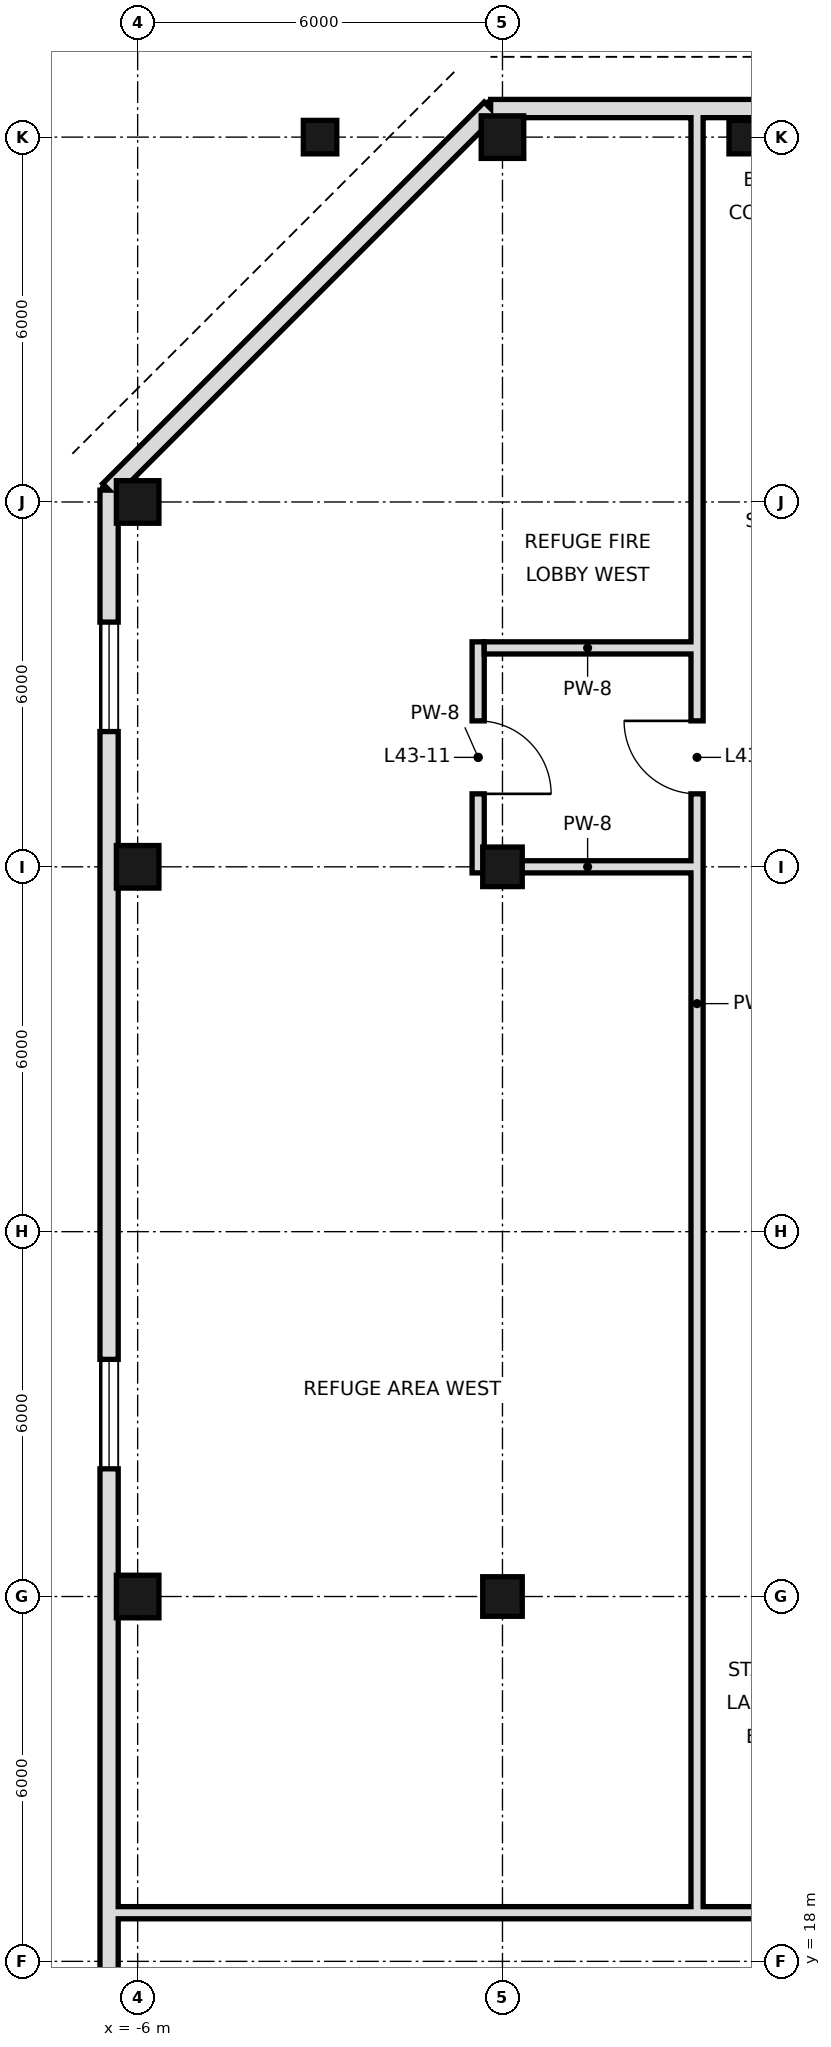
"""IFC4 building model, lengths in metres.
Left out: names, types, materials, properties, quantities, classifications, styles, units other than length and angle.
Written with IfcOpenShell. Run it as: python <this file> out.ifc"""

import sys

from ifc_helpers import new_model, si_unit, direction, frame, frame_2d, origin, origin_2d, place, context, subcontext, project, spatial, rectangle, hollow_rectangle, extrude, element, fill, save


model = new_model("IFC4")
c1 = context("Model", 3, precision=1e-05, world=origin(), true_north=direction((0.0, 1.0)))
c2 = subcontext(c1, "Body", "Model", "MODEL_VIEW")
j1 = project(units=[si_unit("LENGTHUNIT", "METRE"), si_unit("PLANEANGLEUNIT", "RADIAN")], contexts=[c1])
p1 = place(None, origin())
s1 = spatial("IfcSite", under=j1, at=p1, CompositionType="ELEMENT")
p2 = place(p1, origin())
s2 = spatial("IfcBuilding", under=s1, at=p2, CompositionType="ELEMENT")
p3 = place(p2, frame((0.0, 0.0, 186.0)))
s3 = spatial("IfcBuildingStorey", under=s2, at=p3, CompositionType="ELEMENT", Elevation=186.0)
for number, where, z_axis, x_axis in (
    (1, (-6.0, 24.0, 0.0), (0.0, 0.0, 1.0), (1.0, 0.0, 0.0)),
    (2, (-6.0, 36.0, 0.0), (0.0, 0.0, 1.0), (1.0, 0.0, 0.0)),
    (3, (-6.0, 42.0, 0.0), (0.0, 0.0, 1.0), (1.0, 0.0, 0.0)),
):
    element("IfcColumn", number, at=place(p3, frame(where, z_axis=z_axis, x_axis=x_axis)), inside=s3, PredefinedType="COLUMN", context=c2, shape_type="SweptSolid", body=[
        extrude(hollow_rectangle(XDim=0.7, YDim=0.7, WallThickness=0.036, at=origin_2d()), origin(), (0.0, 0.0, 1.0), 6.0),
    ])
for number, where, z_axis, x_axis in (
    (4, (0.0, 24.0, 0.0), (0.0, 0.0, 1.0), (1.0, 0.0, 0.0)),
    (5, (0.0, 36.0, 0.0), (0.0, 0.0, 1.0), (1.0, 0.0, 0.0)),
):
    element("IfcColumn", number, at=place(p3, frame(where, z_axis=z_axis, x_axis=x_axis)), inside=s3, PredefinedType="COLUMN", context=c2, shape_type="SweptSolid", body=[
        extrude(hollow_rectangle(XDim=0.65, YDim=0.65, WallThickness=0.032, at=origin_2d()), origin(), (0.0, 0.0, 1.0), 6.0),
    ])
p4 = place(p3, frame((0.0, 48.0, 0.0), z_axis=(0.0, 0.0, 1.0), x_axis=(1.0, 0.0, 0.0)))
e6 = element("IfcColumn", 6, at=p4, inside=s3, PredefinedType="COLUMN", context=c2, shape_type="SweptSolid", body=[
    extrude(hollow_rectangle(XDim=0.7, YDim=0.7, WallThickness=0.036, at=origin_2d()), origin(), (0.0, 0.0, 1.0), 6.0),
])
for number, where, z_axis, x_axis in (
    (7, (-3.0, 48.0, 1.1), (0.0, 0.0, 1.0), (1.0, 0.0, 0.0)),
    (8, (4.0, 48.0, 1.1), (0.0, 0.0, 1.0), (1.0, 0.0, 0.0)),
):
    element("IfcColumn", number, at=place(p3, frame(where, z_axis=z_axis, x_axis=x_axis)), inside=s3, PredefinedType="COLUMN", context=c2, shape_type="SweptSolid", body=[
        extrude(hollow_rectangle(XDim=0.55, YDim=0.55, WallThickness=0.036, at=origin_2d()), origin(), (0.0, 0.0, 1.0), 3.5),
    ])
p5 = place(p3, frame((54.195, 48.47, 0.0), z_axis=(0.0, 0.0, 1.0), x_axis=(-1.0, 0.0, 0.0)))
e9 = element("IfcWall", 9, at=p5, inside=s3, PredefinedType="SOLIDWALL", context=c2, shape_type="SweptSolid", body=[
    extrude(rectangle(XDim=54.389, YDim=0.3, at=frame_2d((27.195, 0.0))), origin(), (0.0, 0.0, 1.0), 5.7),
])
p6 = place(p3, frame((-0.195, 48.47, 0.0), z_axis=(0.0, 0.0, 1.0), x_axis=(-0.707106781187, -0.707106781187, 0.0)))
e10 = element("IfcWall", 10, at=p6, inside=s3, PredefinedType="SOLIDWALL", context=c2, shape_type="SweptSolid", body=[
    extrude(rectangle(XDim=8.875, YDim=0.3, at=frame_2d((4.438, 0.0))), origin(), (0.0, 0.0, 1.0), 5.7),
])
p7 = place(p3, frame((-6.47, 42.195, 0.0), z_axis=(0.0, 0.0, 1.0), x_axis=(0.0, -1.0, 0.0)))
e11 = element("IfcWall", 11, at=p7, inside=s3, PredefinedType="SOLIDWALL", context=c2, shape_type="SweptSolid", body=[
    extrude(rectangle(XDim=36.389, YDim=0.3, at=frame_2d((18.195, 0.0))), origin(), (0.0, 0.0, 1.0), 5.7),
])
p8 = place(p7, frame((2.17, 0.0, 0.9)))
e12 = element("IfcOpeningElement", 12, at=p8, cuts=e11, PredefinedType="OPENING", context=c2, shape_type="SweptSolid", body=[
    extrude(rectangle(XDim=1.8, YDim=1.5, at=frame_2d((0.9, 0.75))), frame((0.0, 0.16, 0.0), z_axis=(0.0, -1.0, 0.0), x_axis=(1.0, 0.0, 0.0)), (0.0, 0.0, 1.0), 0.32),
])
p9 = place(p7, frame((14.295, 0.0, 0.9)))
e13 = element("IfcOpeningElement", 13, at=p9, cuts=e11, PredefinedType="OPENING", context=c2, shape_type="SweptSolid", body=[
    extrude(rectangle(XDim=1.8, YDim=1.5, at=frame_2d((0.9, 0.75))), frame((0.0, 0.16, 0.0), z_axis=(0.0, -1.0, 0.0), x_axis=(1.0, 0.0, 0.0)), (0.0, 0.0, 1.0), 0.32),
])
p10 = place(p7, frame((26.295, 0.0, 0.9)))
e14 = element("IfcOpeningElement", 14, at=p10, cuts=e11, PredefinedType="OPENING", context=c2, shape_type="SweptSolid", body=[
    extrude(rectangle(XDim=1.8, YDim=1.5, at=frame_2d((0.9, 0.75))), frame((0.0, 0.16, 0.0), z_axis=(0.0, -1.0, 0.0), x_axis=(1.0, 0.0, 0.0)), (0.0, 0.0, 1.0), 0.32),
])
p11 = place(p3, frame((-0.4, 35.9, 0.0), z_axis=(0.0, 0.0, 1.0), x_axis=(0.0, 1.0, 0.0)))
e15 = element("IfcWall", 15, at=p11, inside=s3, PredefinedType="SOLIDWALL", context=c2, shape_type="SweptSolid", body=[
    extrude(rectangle(XDim=3.8, YDim=0.2, at=frame_2d((1.9, 0.0))), origin(), (0.0, 0.0, 1.0), 5.7),
])
p12 = place(p11, frame((1.3, 0.0, 0.0)))
e16 = element("IfcOpeningElement", 16, at=p12, cuts=e15, PredefinedType="OPENING", context=c2, shape_type="SweptSolid", body=[
    extrude(rectangle(XDim=1.2, YDim=2.4, at=frame_2d((0.6, 1.2))), frame((0.0, 0.11, 0.0), z_axis=(0.0, -1.0, 0.0), x_axis=(1.0, 0.0, 0.0)), (0.0, 0.0, 1.0), 0.22),
])
p13 = place(p3, frame((3.2, 18.9, 0.0), z_axis=(0.0, 0.0, 1.0), x_axis=(0.0, 1.0, 0.0)))
e17 = element("IfcWall", 17, at=p13, inside=s3, PredefinedType="SOLIDWALL", context=c2, shape_type="SweptSolid", body=[
    extrude(rectangle(XDim=29.7, YDim=0.2, at=frame_2d((14.85, 0.0))), origin(), (0.0, 0.0, 1.0), 5.25),
])
p14 = place(p13, frame((18.3, 0.0, 0.0)))
e18 = element("IfcOpeningElement", 18, at=p14, cuts=e17, PredefinedType="OPENING", context=c2, shape_type="SweptSolid", body=[
    extrude(rectangle(XDim=1.2, YDim=2.4, at=frame_2d((0.6, 1.2))), frame((0.0, 0.11, 0.0), z_axis=(0.0, -1.0, 0.0), x_axis=(1.0, 0.0, 0.0)), (0.0, 0.0, 1.0), 0.22),
])
p15 = place(p3, frame((-6.6, 18.8, 0.0), z_axis=(0.0, 0.0, 1.0), x_axis=(1.0, 0.0, 0.0)))
e19 = element("IfcWall", 19, at=p15, inside=s3, PredefinedType="SOLIDWALL", context=c2, shape_type="SweptSolid", body=[
    extrude(rectangle(XDim=67.2, YDim=0.2, at=frame_2d((33.6, 0.0))), origin(), (0.0, 0.0, 1.0), 5.0),
])
p16 = place(p15, frame((17.2, 0.0, 0.0)))
e20 = element("IfcOpeningElement", 20, at=p16, cuts=e19, PredefinedType="OPENING", context=c2, shape_type="SweptSolid", body=[
    extrude(rectangle(XDim=1.2, YDim=2.4, at=frame_2d((0.6, 1.2))), frame((0.0, 0.11, 0.0), z_axis=(0.0, -1.0, 0.0), x_axis=(1.0, 0.0, 0.0)), (0.0, 0.0, 1.0), 0.22),
])
p17 = place(p3, frame((-0.3, 36.0, 0.0), z_axis=(0.0, 0.0, 1.0), x_axis=(1.0, 0.0, 0.0)))
e21 = element("IfcWall", 21, at=p17, inside=s3, PredefinedType="SOLIDWALL", context=c2, shape_type="SweptSolid", body=[
    extrude(rectangle(XDim=3.4, YDim=0.2, at=frame_2d((1.7, 0.0))), origin(), (0.0, 0.0, 1.0), 5.7),
])
p18 = place(p3, frame((-0.3, 39.6, 0.0), z_axis=(0.0, 0.0, 1.0), x_axis=(1.0, 0.0, 0.0)))
e22 = element("IfcWall", 22, at=p18, inside=s3, PredefinedType="SOLIDWALL", context=c2, shape_type="SweptSolid", body=[
    extrude(rectangle(XDim=3.4, YDim=0.2, at=frame_2d((1.7, 0.0))), origin(), (0.0, 0.0, 1.0), 5.0),
])
p19 = place(p8, origin())
e23 = element("IfcWindow", 23, at=p19, inside=s3, PartitioningType="SINGLE_PANEL", PredefinedType="WINDOW", context=c2, shape_type="SweptSolid", body=[
    extrude(rectangle(XDim=1.8, YDim=1.5, at=frame_2d((0.9, 0.75))), frame((0.0, 0.03, 0.0), z_axis=(0.0, -1.0, 0.0), x_axis=(1.0, 0.0, 0.0)), (0.0, 0.0, 1.0), 0.06),
])
fill(e12, e23)
p20 = place(p9, origin())
e24 = element("IfcWindow", 24, at=p20, inside=s3, PartitioningType="SINGLE_PANEL", PredefinedType="WINDOW", context=c2, shape_type="SweptSolid", body=[
    extrude(rectangle(XDim=1.8, YDim=1.5, at=frame_2d((0.9, 0.75))), frame((0.0, 0.03, 0.0), z_axis=(0.0, -1.0, 0.0), x_axis=(1.0, 0.0, 0.0)), (0.0, 0.0, 1.0), 0.06),
])
fill(e13, e24)
p21 = place(p12, frame((1.2, 0.0, 0.0), z_axis=(0.0, 0.0, 1.0), x_axis=(-1.0, 0.0, 0.0)))
e25 = element("IfcDoor", 25, at=p21, inside=s3, OperationType="SINGLE_SWING_RIGHT", PredefinedType="DOOR", context=c2, shape_type="SweptSolid", body=[
    extrude(rectangle(XDim=1.2, YDim=2.4, at=frame_2d((0.6, 1.2))), frame((0.0, 0.025, 0.0), z_axis=(0.0, -1.0, 0.0), x_axis=(1.0, 0.0, 0.0)), (0.0, 0.0, 1.0), 0.05),
])
fill(e16, e25)
p22 = place(p14, frame((1.2, 0.0, 0.0), z_axis=(0.0, 0.0, 1.0), x_axis=(-1.0, 0.0, 0.0)))
e26 = element("IfcDoor", 26, at=p22, inside=s3, OperationType="SINGLE_SWING_LEFT", PredefinedType="DOOR", context=c2, shape_type="SweptSolid", body=[
    extrude(rectangle(XDim=1.2, YDim=2.4, at=frame_2d((0.6, 1.2))), frame((0.0, 0.025, 0.0), z_axis=(0.0, -1.0, 0.0), x_axis=(1.0, 0.0, 0.0)), (0.0, 0.0, 1.0), 0.05),
])
fill(e18, e26)
save(model, sys.argv[1])
